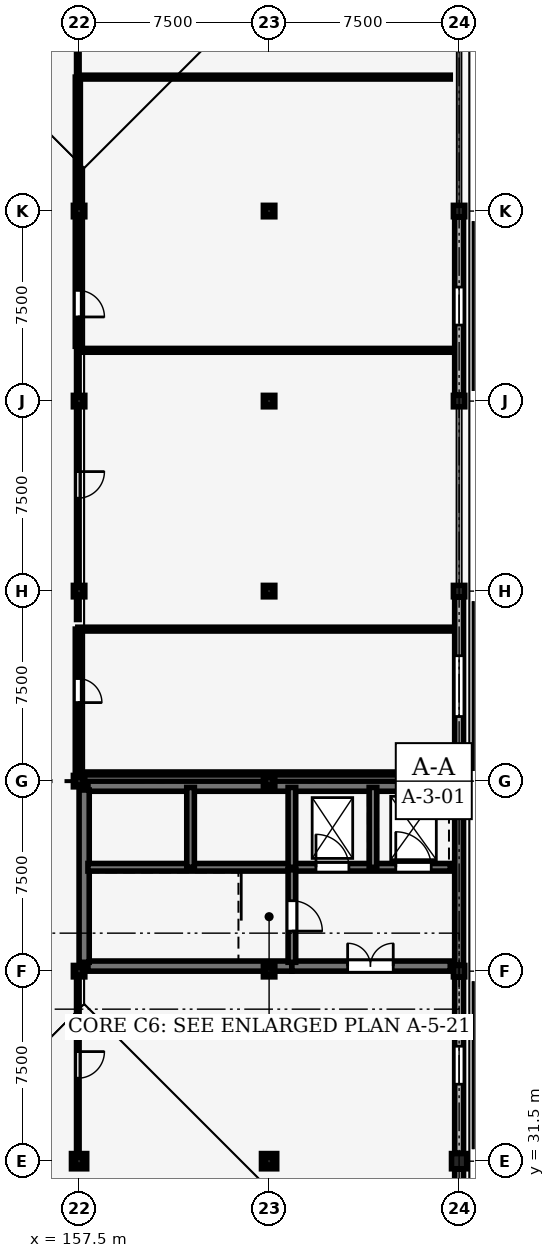
"""IFC4 building model, lengths in metres.
Left out: names, types, materials, properties, quantities, classifications, styles, units other than length and angle.
Written with IfcOpenShell. Run it as: python <this file> out.ifc"""

import sys

from ifc_helpers import new_model, si_unit, direction, frame, frame_2d, origin, origin_2d, place, context, subcontext, project, spatial, rectangle, circle, i_section, extrude, element, fill, save


model = new_model("IFC4")
c1 = context("Model", 3, precision=1e-05, world=origin(), true_north=direction((0.0, 1.0)))
c2 = subcontext(c1, "Body", "Model", "MODEL_VIEW")
j1 = project(units=[si_unit("LENGTHUNIT", "METRE"), si_unit("PLANEANGLEUNIT", "RADIAN")], contexts=[c1])
p1 = place(None, origin())
s1 = spatial("IfcSite", under=j1, at=p1, CompositionType="ELEMENT")
p2 = place(p1, origin())
s2 = spatial("IfcBuilding", under=s1, at=p2, CompositionType="ELEMENT")
p3 = place(p2, frame((0.0, 0.0, 9.3)))
s3 = spatial("IfcBuildingStorey", under=s2, at=p3, CompositionType="ELEMENT", Elevation=9.3)
p4 = place(p3, frame((157.5, 31.5, 0.0), z_axis=(0.0, 0.0, 1.0), x_axis=(1.0, 0.0, 0.0)))
e1 = element("IfcColumn", 1, at=p4, inside=s3, PredefinedType="COLUMN", context=c2, shape_type="SweptSolid", body=[
    extrude(rectangle(XDim=0.6, YDim=0.6, at=origin_2d()), origin(), (0.0, 0.0, 1.0), 4.8),
])
for number, where, z_axis, x_axis in (
    (2, (157.5, 39.0, 0.0), (0.0, 0.0, 1.0), (1.0, 0.0, 0.0)),
    (3, (157.5, 46.5, 0.0), (0.0, 0.0, 1.0), (1.0, 0.0, 0.0)),
    (4, (157.5, 54.0, 0.0), (0.0, 0.0, 1.0), (1.0, 0.0, 0.0)),
    (5, (157.5, 61.5, 0.0), (0.0, 0.0, 1.0), (1.0, 0.0, 0.0)),
    (6, (157.5, 69.0, 0.0), (0.0, 0.0, 1.0), (1.0, 0.0, 0.0)),
):
    element("IfcColumn", number, at=place(p3, frame(where, z_axis=z_axis, x_axis=x_axis)), inside=s3, PredefinedType="COLUMN", context=c2, shape_type="SweptSolid", body=[
        extrude(rectangle(XDim=0.45, YDim=0.45, at=origin_2d()), origin(), (0.0, 0.0, 1.0), 4.8),
    ])
p5 = place(p3, frame((165.0, 31.5, 0.0), z_axis=(0.0, 0.0, 1.0), x_axis=(1.0, 0.0, 0.0)))
e7 = element("IfcColumn", 7, at=p5, inside=s3, PredefinedType="COLUMN", context=c2, shape_type="SweptSolid", body=[
    extrude(rectangle(XDim=0.6, YDim=0.6, at=origin_2d()), origin(), (0.0, 0.0, 1.0), 4.8),
])
for number, where, z_axis, x_axis in (
    (8, (165.0, 39.0, 0.0), (0.0, 0.0, 1.0), (1.0, 0.0, 0.0)),
    (9, (165.0, 46.5, 0.0), (0.0, 0.0, 1.0), (1.0, 0.0, 0.0)),
    (10, (165.0, 54.0, 0.0), (0.0, 0.0, 1.0), (1.0, 0.0, 0.0)),
    (11, (165.0, 61.5, 0.0), (0.0, 0.0, 1.0), (1.0, 0.0, 0.0)),
    (12, (165.0, 69.0, 0.0), (0.0, 0.0, 1.0), (1.0, 0.0, 0.0)),
):
    element("IfcColumn", number, at=place(p3, frame(where, z_axis=z_axis, x_axis=x_axis)), inside=s3, PredefinedType="COLUMN", context=c2, shape_type="SweptSolid", body=[
        extrude(rectangle(XDim=0.45, YDim=0.45, at=origin_2d()), origin(), (0.0, 0.0, 1.0), 4.8),
    ])
p6 = place(p3, frame((172.5, 31.5, 0.0), z_axis=(0.0, 0.0, 1.0), x_axis=(1.0, 0.0, 0.0)))
e13 = element("IfcColumn", 13, at=p6, inside=s3, PredefinedType="COLUMN", context=c2, shape_type="SweptSolid", body=[
    extrude(circle(Radius=0.3, at=origin_2d()), origin(), (0.0, 0.0, 1.0), 4.8),
])
for number, where, z_axis, x_axis in (
    (14, (172.5, 39.0, 0.0), (0.0, 0.0, 1.0), (1.0, 0.0, 0.0)),
    (15, (172.5, 46.5, 0.0), (0.0, 0.0, 1.0), (1.0, 0.0, 0.0)),
    (16, (172.5, 54.0, 0.0), (0.0, 0.0, 1.0), (1.0, 0.0, 0.0)),
    (17, (172.5, 61.5, 0.0), (0.0, 0.0, 1.0), (1.0, 0.0, 0.0)),
    (18, (172.5, 69.0, 0.0), (0.0, 0.0, 1.0), (1.0, 0.0, 0.0)),
):
    element("IfcColumn", number, at=place(p3, frame(where, z_axis=z_axis, x_axis=x_axis)), inside=s3, PredefinedType="COLUMN", context=c2, shape_type="SweptSolid", body=[
        extrude(rectangle(XDim=0.45, YDim=0.45, at=origin_2d()), origin(), (0.0, 0.0, 1.0), 4.8),
    ])
p7 = place(p3, frame((157.5, 31.5, 4.8), z_axis=(0.0, 0.0, 1.0), x_axis=(1.0, 0.0, 0.0)))
e19 = element("IfcColumn", 19, at=p7, inside=s3, PredefinedType="COLUMN", context=c2, shape_type="SweptSolid", body=[
    extrude(i_section(OverallWidth=0.3, OverallDepth=0.3, WebThickness=0.011, FlangeThickness=0.019, FilletRadius=0.027, at=origin_2d()), origin(), (0.0, 0.0, 1.0), 2.24),
])
for number, where, z_axis, x_axis in (
    (20, (157.5, 39.0, 4.8), (0.0, 0.0, 1.0), (1.0, 0.0, 0.0)),
    (21, (157.5, 46.5, 4.8), (0.0, 0.0, 1.0), (1.0, 0.0, 0.0)),
    (22, (157.5, 54.0, 4.8), (0.0, 0.0, 1.0), (1.0, 0.0, 0.0)),
    (23, (157.5, 61.5, 4.8), (0.0, 0.0, 1.0), (1.0, 0.0, 0.0)),
    (24, (157.5, 69.0, 4.8), (0.0, 0.0, 1.0), (1.0, 0.0, 0.0)),
):
    element("IfcColumn", number, at=place(p3, frame(where, z_axis=z_axis, x_axis=x_axis)), inside=s3, PredefinedType="COLUMN", context=c2, shape_type="SweptSolid", body=[
        extrude(i_section(OverallWidth=0.3, OverallDepth=0.3, WebThickness=0.011, FlangeThickness=0.019, FilletRadius=0.027, at=origin_2d()), origin(), (0.0, 0.0, 1.0), 3.714),
    ])
for number, where, z_axis, x_axis in (
    (25, (165.0, 31.5, 4.8), (0.0, 0.0, 1.0), (1.0, 0.0, 0.0)),
    (26, (165.0, 39.0, 4.8), (0.0, 0.0, 1.0), (1.0, 0.0, 0.0)),
    (27, (165.0, 46.5, 4.8), (0.0, 0.0, 1.0), (1.0, 0.0, 0.0)),
    (28, (165.0, 54.0, 4.8), (0.0, 0.0, 1.0), (1.0, 0.0, 0.0)),
    (29, (165.0, 61.5, 4.8), (0.0, 0.0, 1.0), (1.0, 0.0, 0.0)),
    (30, (165.0, 69.0, 4.8), (0.0, 0.0, 1.0), (1.0, 0.0, 0.0)),
):
    element("IfcColumn", number, at=place(p3, frame(where, z_axis=z_axis, x_axis=x_axis)), inside=s3, PredefinedType="COLUMN", context=c2, shape_type="SweptSolid", body=[
        extrude(i_section(OverallWidth=0.3, OverallDepth=0.3, WebThickness=0.011, FlangeThickness=0.019, FilletRadius=0.027, at=origin_2d()), origin(), (0.0, 0.0, 1.0), 1.97),
    ])
p8 = place(p3, frame((172.5, 31.19, 0.0), z_axis=(0.0, 0.0, 1.0), x_axis=(0.0, -1.0, 0.0)))
e31 = element("IfcWall", 31, at=p8, inside=s3, PredefinedType="STANDARD", context=c2, shape_type="SweptSolid", body=[
    extrude(rectangle(XDim=8.33, YDim=0.35, at=frame_2d((4.165, 0.0))), origin(), (0.0, 0.0, 1.0), 4.55),
])
p9 = place(p8, frame((3.265, 0.0, 0.9)))
e32 = element("IfcOpeningElement", 32, at=p9, cuts=e31, PredefinedType="OPENING", context=c2, shape_type="SweptSolid", body=[
    extrude(rectangle(XDim=1.8, YDim=2.4, at=frame_2d((0.9, 1.2))), frame((0.0, 0.185, 0.0), z_axis=(0.0, -1.0, 0.0), x_axis=(1.0, 0.0, 0.0)), (0.0, 0.0, 1.0), 0.37),
])
p10 = place(p3, frame((172.5, 38.765, 0.0), z_axis=(0.0, 0.0, 1.0), x_axis=(0.0, -1.0, 0.0)))
e33 = element("IfcWall", 33, at=p10, inside=s3, PredefinedType="STANDARD", context=c2, shape_type="SweptSolid", body=[
    extrude(rectangle(XDim=6.955, YDim=0.35, at=frame_2d((3.478, 0.0))), origin(), (0.0, 0.0, 1.0), 4.55),
])
p11 = place(p10, frame((2.728, 0.0, 0.9)))
e34 = element("IfcOpeningElement", 34, at=p11, cuts=e33, PredefinedType="OPENING", context=c2, shape_type="SweptSolid", body=[
    extrude(rectangle(XDim=1.5, YDim=2.4, at=frame_2d((0.75, 1.2))), frame((0.0, 0.185, 0.0), z_axis=(0.0, -1.0, 0.0), x_axis=(1.0, 0.0, 0.0)), (0.0, 0.0, 1.0), 0.37),
])
p12 = place(p3, frame((172.5, 46.265, 0.0), z_axis=(0.0, 0.0, 1.0), x_axis=(0.0, -1.0, 0.0)))
e35 = element("IfcWall", 35, at=p12, inside=s3, PredefinedType="SHEAR", context=c2, shape_type="SweptSolid", body=[
    extrude(rectangle(XDim=7.03, YDim=0.35, at=frame_2d((3.515, 0.0))), origin(), (0.0, 0.0, 1.0), 4.55),
])
p13 = place(p3, frame((172.5, 53.765, 0.0), z_axis=(0.0, 0.0, 1.0), x_axis=(0.0, -1.0, 0.0)))
e36 = element("IfcWall", 36, at=p13, inside=s3, PredefinedType="STANDARD", context=c2, shape_type="SweptSolid", body=[
    extrude(rectangle(XDim=7.03, YDim=0.35, at=frame_2d((3.515, 0.0))), origin(), (0.0, 0.0, 1.0), 4.55),
])
p14 = place(p13, frame((2.315, 0.0, 0.9)))
e37 = element("IfcOpeningElement", 37, at=p14, cuts=e36, PredefinedType="OPENING", context=c2, shape_type="SweptSolid", body=[
    extrude(rectangle(XDim=2.4, YDim=2.5, at=frame_2d((1.2, 1.25))), frame((0.0, 0.185, 0.0), z_axis=(0.0, -1.0, 0.0), x_axis=(1.0, 0.0, 0.0)), (0.0, 0.0, 1.0), 0.37),
])
p15 = place(p3, frame((172.5, 68.765, 0.0), z_axis=(0.0, 0.0, 1.0), x_axis=(0.0, -1.0, 0.0)))
e38 = element("IfcWall", 38, at=p15, inside=s3, PredefinedType="STANDARD", context=c2, shape_type="SweptSolid", body=[
    extrude(rectangle(XDim=7.03, YDim=0.35, at=frame_2d((3.515, 0.0))), origin(), (0.0, 0.0, 1.0), 4.55),
])
p16 = place(p15, frame((2.765, 0.0, 0.9)))
e39 = element("IfcOpeningElement", 39, at=p16, cuts=e38, PredefinedType="OPENING", context=c2, shape_type="SweptSolid", body=[
    extrude(rectangle(XDim=1.5, YDim=2.1, at=frame_2d((0.75, 1.05))), frame((0.0, 0.185, 0.0), z_axis=(0.0, -1.0, 0.0), x_axis=(1.0, 0.0, 0.0)), (0.0, 0.0, 1.0), 0.37),
])
p17 = place(p3, frame((157.85, 39.2, 0.0), z_axis=(0.0, 0.0, 1.0), x_axis=(1.0, 0.0, 0.0)))
e40 = element("IfcWall", 40, at=p17, inside=s3, PredefinedType="SHEAR", context=c2, shape_type="SweptSolid", body=[
    extrude(rectangle(XDim=8.05, YDim=0.4, at=frame_2d((4.025, 0.0))), origin(), (0.0, 0.0, 1.0), 4.55),
])
p18 = place(p3, frame((165.9, 39.2, 0.0), z_axis=(0.0, 0.0, 1.0), x_axis=(1.0, 0.0, 0.0)))
e41 = element("IfcWall", 41, at=p18, inside=s3, PredefinedType="SHEAR", context=c2, shape_type="SweptSolid", body=[
    extrude(rectangle(XDim=6.25, YDim=0.4, at=frame_2d((3.125, 0.0))), origin(), (0.0, 0.0, 1.0), 4.55),
])
p19 = place(p18, frame((2.2, 0.0, 0.0)))
e42 = element("IfcOpeningElement", 42, at=p19, cuts=e41, PredefinedType="OPENING", context=c2, shape_type="SweptSolid", body=[
    extrude(rectangle(XDim=1.8, YDim=2.25, at=frame_2d((0.9, 1.125))), frame((0.0, 0.21, 0.0), z_axis=(0.0, -1.0, 0.0), x_axis=(1.0, 0.0, 0.0)), (0.0, 0.0, 1.0), 0.42),
])
p20 = place(p3, frame((157.85, 46.3, 0.0), z_axis=(0.0, 0.0, 1.0), x_axis=(1.0, 0.0, 0.0)))
e43 = element("IfcWall", 43, at=p20, inside=s3, PredefinedType="SHEAR", context=c2, shape_type="SweptSolid", body=[
    extrude(rectangle(XDim=14.3, YDim=0.4, at=frame_2d((7.15, 0.0))), origin(), (0.0, 0.0, 1.0), 4.55),
])
p21 = place(p3, frame((157.7, 39.35, 0.0), z_axis=(0.0, 0.0, 1.0), x_axis=(0.0, 1.0, 0.0)))
e44 = element("IfcWall", 44, at=p21, inside=s3, PredefinedType="SHEAR", context=c2, shape_type="SweptSolid", body=[
    extrude(rectangle(XDim=6.8, YDim=0.4, at=frame_2d((3.4, 0.0))), origin(), (0.0, 0.0, 1.0), 4.55),
])
p22 = place(p3, frame((157.85, 43.1, 0.0), z_axis=(0.0, 0.0, 1.0), x_axis=(1.0, 0.0, 0.0)))
e45 = element("IfcWall", 45, at=p22, inside=s3, PredefinedType="SHEAR", context=c2, shape_type="SweptSolid", body=[
    extrude(rectangle(XDim=8.05, YDim=0.3, at=frame_2d((4.025, 0.0))), origin(), (0.0, 0.0, 1.0), 4.55),
])
p23 = place(p3, frame((165.9, 43.1, 0.0), z_axis=(0.0, 0.0, 1.0), x_axis=(1.0, 0.0, 0.0)))
e46 = element("IfcWall", 46, at=p23, inside=s3, PredefinedType="SHEAR", context=c2, shape_type="SweptSolid", body=[
    extrude(rectangle(XDim=6.25, YDim=0.3, at=frame_2d((3.125, 0.0))), origin(), (0.0, 0.0, 1.0), 4.55),
])
p24 = place(p23, frame((0.95, 0.0, 0.0)))
e47 = element("IfcOpeningElement", 47, at=p24, cuts=e46, PredefinedType="OPENING", context=c2, shape_type="SweptSolid", body=[
    extrude(rectangle(XDim=1.3, YDim=2.2, at=frame_2d((0.65, 1.1))), frame((0.0, 0.16, 0.0), z_axis=(0.0, -1.0, 0.0), x_axis=(1.0, 0.0, 0.0)), (0.0, 0.0, 1.0), 0.32),
])
p25 = place(p23, frame((4.1, 0.0, 0.0)))
e48 = element("IfcOpeningElement", 48, at=p25, cuts=e46, PredefinedType="OPENING", context=c2, shape_type="SweptSolid", body=[
    extrude(rectangle(XDim=1.4, YDim=2.25, at=frame_2d((0.7, 1.125))), frame((0.0, 0.16, 0.0), z_axis=(0.0, -1.0, 0.0), x_axis=(1.0, 0.0, 0.0)), (0.0, 0.0, 1.0), 0.32),
])
p26 = place(p3, frame((165.9, 43.0, 0.0), z_axis=(0.0, 0.0, 1.0), x_axis=(0.0, -1.0, 0.0)))
e49 = element("IfcWall", 49, at=p26, inside=s3, PredefinedType="SHEAR", context=c2, shape_type="SweptSolid", body=[
    extrude(rectangle(XDim=3.65, YDim=0.3, at=frame_2d((1.825, 0.0))), origin(), (0.0, 0.0, 1.0), 4.55),
])
p27 = place(p26, frame((1.22, 0.0, 0.0)))
e50 = element("IfcOpeningElement", 50, at=p27, cuts=e49, PredefinedType="OPENING", context=c2, shape_type="SweptSolid", body=[
    extrude(rectangle(XDim=1.2, YDim=2.25, at=frame_2d((0.6, 1.125))), frame((0.0, 0.16, 0.0), z_axis=(0.0, -1.0, 0.0), x_axis=(1.0, 0.0, 0.0)), (0.0, 0.0, 1.0), 0.32),
])
for number, where, z_axis, x_axis in (
    (51, (161.9, 43.1, 0.0), (0.0, 0.0, 1.0), (0.0, 1.0, 0.0)),
    (52, (165.9, 43.1, 0.0), (0.0, 0.0, 1.0), (0.0, 1.0, 0.0)),
    (53, (169.1, 43.1, 0.0), (0.0, 0.0, 1.0), (0.0, 1.0, 0.0)),
):
    element("IfcWall", number, at=place(p3, frame(where, z_axis=z_axis, x_axis=x_axis)), inside=s3, PredefinedType="SHEAR", context=c2, shape_type="SweptSolid", body=[
        extrude(rectangle(XDim=3.15, YDim=0.3, at=frame_2d((1.575, 0.0))), origin(), (0.0, 0.0, 1.0), 4.55),
    ])
p28 = place(p3, frame((157.45, 38.75, 0.0), z_axis=(0.0, 0.0, 1.0), x_axis=(0.0, -1.0, 0.0)))
e54 = element("IfcWall", 54, at=p28, inside=s3, PredefinedType="PARTITIONING", context=c2, shape_type="SweptSolid", body=[
    extrude(rectangle(XDim=6.9, YDim=0.1, at=frame_2d((3.45, 0.0))), origin(), (0.0, 0.0, 1.0), 4.535),
])
p29 = place(p28, frame((2.925, 0.0, 0.0)))
e55 = element("IfcOpeningElement", 55, at=p29, cuts=e54, PredefinedType="OPENING", context=c2, shape_type="SweptSolid", body=[
    extrude(rectangle(XDim=1.05, YDim=2.2, at=frame_2d((0.525, 1.1))), frame((0.0, 0.06, 0.0), z_axis=(0.0, -1.0, 0.0), x_axis=(1.0, 0.0, 0.0)), (0.0, 0.0, 1.0), 0.12),
])
p30 = place(p3, frame((157.45, 52.5, 0.0), z_axis=(0.0, 0.0, 1.0), x_axis=(0.0, -1.0, 0.0)))
e56 = element("IfcWall", 56, at=p30, inside=s3, PredefinedType="STANDARD", context=c2, shape_type="SweptSolid", body=[
    extrude(rectangle(XDim=5.7, YDim=0.2, at=frame_2d((2.85, 0.0))), origin(), (0.0, 0.0, 1.0), 4.535),
])
p31 = place(p30, frame((1.95, 0.0, 0.0)))
e57 = element("IfcOpeningElement", 57, at=p31, cuts=e56, PredefinedType="OPENING", context=c2, shape_type="SweptSolid", body=[
    extrude(rectangle(XDim=0.95, YDim=2.15, at=frame_2d((0.475, 1.075))), frame((0.0, 0.11, 0.0), z_axis=(0.0, -1.0, 0.0), x_axis=(1.0, 0.0, 0.0)), (0.0, 0.0, 1.0), 0.22),
])
p32 = place(p3, frame((157.45, 63.503, 0.0), z_axis=(0.0, 0.0, 1.0), x_axis=(0.0, -1.0, 0.0)))
e58 = element("IfcWall", 58, at=p32, inside=s3, PredefinedType="PARTITIONING", context=c2, shape_type="SweptSolid", body=[
    extrude(rectangle(XDim=10.624, YDim=0.1, at=frame_2d((5.312, 0.0))), origin(), (0.0, 0.0, 1.0), 4.535),
])
p33 = place(p32, frame((4.787, 0.0, 0.0)))
e59 = element("IfcOpeningElement", 59, at=p33, cuts=e58, PredefinedType="OPENING", context=c2, shape_type="SweptSolid", body=[
    extrude(rectangle(XDim=1.05, YDim=2.2, at=frame_2d((0.525, 1.1))), frame((0.0, 0.06, 0.0), z_axis=(0.0, -1.0, 0.0), x_axis=(1.0, 0.0, 0.0)), (0.0, 0.0, 1.0), 0.12),
])
p34 = place(p3, frame((157.45, 74.287, 0.0), z_axis=(0.0, 0.0, 1.0), x_axis=(0.0, -1.0, 0.0)))
e60 = element("IfcWall", 60, at=p34, inside=s3, PredefinedType="STANDARD", context=c2, shape_type="SweptSolid", body=[
    extrude(rectangle(XDim=10.623, YDim=0.2, at=frame_2d((5.312, 0.0))), origin(), (0.0, 0.0, 1.0), 4.535),
])
p35 = place(p34, frame((8.416, 0.0, 0.0)))
e61 = element("IfcOpeningElement", 61, at=p35, cuts=e60, PredefinedType="OPENING", context=c2, shape_type="SweptSolid", body=[
    extrude(rectangle(XDim=1.05, YDim=2.2, at=frame_2d((0.525, 1.1))), frame((0.0, 0.11, 0.0), z_axis=(0.0, -1.0, 0.0), x_axis=(1.0, 0.0, 0.0)), (0.0, 0.0, 1.0), 0.22),
])
p36 = place(p3, frame((157.45, 85.07, 0.0), z_axis=(0.0, 0.0, 1.0), x_axis=(0.0, -1.0, 0.0)))
e62 = element("IfcWall", 62, at=p36, inside=s3, PredefinedType="PARTITIONING", context=c2, shape_type="SweptSolid", body=[
    extrude(rectangle(XDim=10.623, YDim=0.1, at=frame_2d((5.312, 0.0))), origin(), (0.0, 0.0, 1.0), 4.535),
])
p37 = place(p36, frame((3.879, 0.0, 0.0)))
e63 = element("IfcOpeningElement", 63, at=p37, cuts=e62, PredefinedType="OPENING", context=c2, shape_type="SweptSolid", body=[
    extrude(rectangle(XDim=1.05, YDim=2.2, at=frame_2d((0.525, 1.1))), frame((0.0, 0.06, 0.0), z_axis=(0.0, -1.0, 0.0), x_axis=(1.0, 0.0, 0.0)), (0.0, 0.0, 1.0), 0.12),
])
for number, where, z_axis, x_axis in (
    (64, (157.45, 52.5, 0.0), (0.0, 0.0, 1.0), (1.0, 0.0, 0.0)),
    (65, (157.45, 63.503, 0.0), (0.0, 0.0, 1.0), (1.0, 0.0, 0.0)),
    (66, (157.45, 74.287, 0.0), (0.0, 0.0, 1.0), (1.0, 0.0, 0.0)),
):
    element("IfcWall", number, at=place(p3, frame(where, z_axis=z_axis, x_axis=x_axis)), inside=s3, PredefinedType="PARTITIONING", context=c2, shape_type="SweptSolid", body=[
        extrude(rectangle(XDim=14.7, YDim=0.15, at=frame_2d((7.35, 0.0))), origin(), (0.0, 0.0, 1.0), 4.535),
    ])
p38 = place(p3, frame((157.775, 46.8, 0.0), z_axis=(0.0, 0.0, 1.0), x_axis=(1.0, 0.0, 0.0)))
e67 = element("IfcWall", 67, at=p38, inside=s3, PredefinedType="PARTITIONING", context=c2, shape_type="SweptSolid", body=[
    extrude(rectangle(XDim=14.375, YDim=0.12, at=frame_2d((7.188, 0.0))), origin(), (0.0, 0.0, 1.0), 4.535),
])
p39 = place(p11, origin())
e68 = element("IfcWindow", 68, at=p39, inside=s3, PartitioningType="SINGLE_PANEL", PredefinedType="WINDOW", context=c2, shape_type="SweptSolid", body=[
    extrude(rectangle(XDim=1.5, YDim=2.4, at=frame_2d((0.75, 1.2))), frame((0.0, 0.03, 0.0), z_axis=(0.0, -1.0, 0.0), x_axis=(1.0, 0.0, 0.0)), (0.0, 0.0, 1.0), 0.06),
])
fill(e34, e68)
p40 = place(p14, origin())
e69 = element("IfcWindow", 69, at=p40, inside=s3, PartitioningType="SINGLE_PANEL", PredefinedType="WINDOW", context=c2, shape_type="SweptSolid", body=[
    extrude(rectangle(XDim=2.4, YDim=2.5, at=frame_2d((1.2, 1.25))), frame((0.0, 0.03, 0.0), z_axis=(0.0, -1.0, 0.0), x_axis=(1.0, 0.0, 0.0)), (0.0, 0.0, 1.0), 0.06),
])
fill(e37, e69)
p41 = place(p16, origin())
e70 = element("IfcWindow", 70, at=p41, inside=s3, PartitioningType="SINGLE_PANEL", PredefinedType="WINDOW", context=c2, shape_type="SweptSolid", body=[
    extrude(rectangle(XDim=1.5, YDim=2.1, at=frame_2d((0.75, 1.05))), frame((0.0, 0.03, 0.0), z_axis=(0.0, -1.0, 0.0), x_axis=(1.0, 0.0, 0.0)), (0.0, 0.0, 1.0), 0.06),
])
fill(e39, e70)
p42 = place(p19, origin())
e71 = element("IfcDoor", 71, at=p42, inside=s3, OperationType="DOUBLE_DOOR_SINGLE_SWING", PredefinedType="DOOR", context=c2, shape_type="SweptSolid", body=[
    extrude(rectangle(XDim=1.8, YDim=2.25, at=frame_2d((0.9, 1.125))), frame((0.0, 0.025, 0.0), z_axis=(0.0, -1.0, 0.0), x_axis=(1.0, 0.0, 0.0)), (0.0, 0.0, 1.0), 0.05),
])
fill(e42, e71)
p43 = place(p24, origin())
e72 = element("IfcDoor", 72, at=p43, inside=s3, OperationType="DOUBLE_DOOR_SLIDING", PredefinedType="DOOR", context=c2, shape_type="SweptSolid", body=[
    extrude(rectangle(XDim=1.3, YDim=2.2, at=frame_2d((0.65, 1.1))), frame((0.0, 0.025, 0.0), z_axis=(0.0, -1.0, 0.0), x_axis=(1.0, 0.0, 0.0)), (0.0, 0.0, 1.0), 0.05),
])
fill(e47, e72)
p44 = place(p25, origin())
e73 = element("IfcDoor", 73, at=p44, inside=s3, OperationType="DOUBLE_DOOR_SLIDING", PredefinedType="DOOR", context=c2, shape_type="SweptSolid", body=[
    extrude(rectangle(XDim=1.4, YDim=2.25, at=frame_2d((0.7, 1.125))), frame((0.0, 0.025, 0.0), z_axis=(0.0, -1.0, 0.0), x_axis=(1.0, 0.0, 0.0)), (0.0, 0.0, 1.0), 0.05),
])
fill(e48, e73)
p45 = place(p27, origin())
e74 = element("IfcDoor", 74, at=p45, inside=s3, OperationType="SINGLE_SWING_RIGHT", PredefinedType="DOOR", context=c2, shape_type="SweptSolid", body=[
    extrude(rectangle(XDim=1.2, YDim=2.25, at=frame_2d((0.6, 1.125))), frame((0.0, 0.025, 0.0), z_axis=(0.0, -1.0, 0.0), x_axis=(1.0, 0.0, 0.0)), (0.0, 0.0, 1.0), 0.05),
])
fill(e50, e74)
p46 = place(p29, origin())
e75 = element("IfcDoor", 75, at=p46, inside=s3, OperationType="SINGLE_SWING_LEFT", PredefinedType="DOOR", context=c2, shape_type="SweptSolid", body=[
    extrude(rectangle(XDim=1.05, YDim=2.2, at=frame_2d((0.525, 1.1))), frame((0.0, 0.025, 0.0), z_axis=(0.0, -1.0, 0.0), x_axis=(1.0, 0.0, 0.0)), (0.0, 0.0, 1.0), 0.05),
])
fill(e55, e75)
p47 = place(p31, origin())
e76 = element("IfcDoor", 76, at=p47, inside=s3, OperationType="SINGLE_SWING_RIGHT", PredefinedType="DOOR", context=c2, shape_type="SweptSolid", body=[
    extrude(rectangle(XDim=0.95, YDim=2.15, at=frame_2d((0.475, 1.075))), frame((0.0, 0.025, 0.0), z_axis=(0.0, -1.0, 0.0), x_axis=(1.0, 0.0, 0.0)), (0.0, 0.0, 1.0), 0.05),
])
fill(e57, e76)
p48 = place(p33, origin())
e77 = element("IfcDoor", 77, at=p48, inside=s3, OperationType="SINGLE_SWING_LEFT", PredefinedType="DOOR", context=c2, shape_type="SweptSolid", body=[
    extrude(rectangle(XDim=1.05, YDim=2.2, at=frame_2d((0.525, 1.1))), frame((0.0, 0.025, 0.0), z_axis=(0.0, -1.0, 0.0), x_axis=(1.0, 0.0, 0.0)), (0.0, 0.0, 1.0), 0.05),
])
fill(e59, e77)
p49 = place(p35, origin())
e78 = element("IfcDoor", 78, at=p49, inside=s3, OperationType="SINGLE_SWING_RIGHT", PredefinedType="DOOR", context=c2, shape_type="SweptSolid", body=[
    extrude(rectangle(XDim=1.05, YDim=2.2, at=frame_2d((0.525, 1.1))), frame((0.0, 0.025, 0.0), z_axis=(0.0, -1.0, 0.0), x_axis=(1.0, 0.0, 0.0)), (0.0, 0.0, 1.0), 0.05),
])
fill(e61, e78)
save(model, sys.argv[1])
